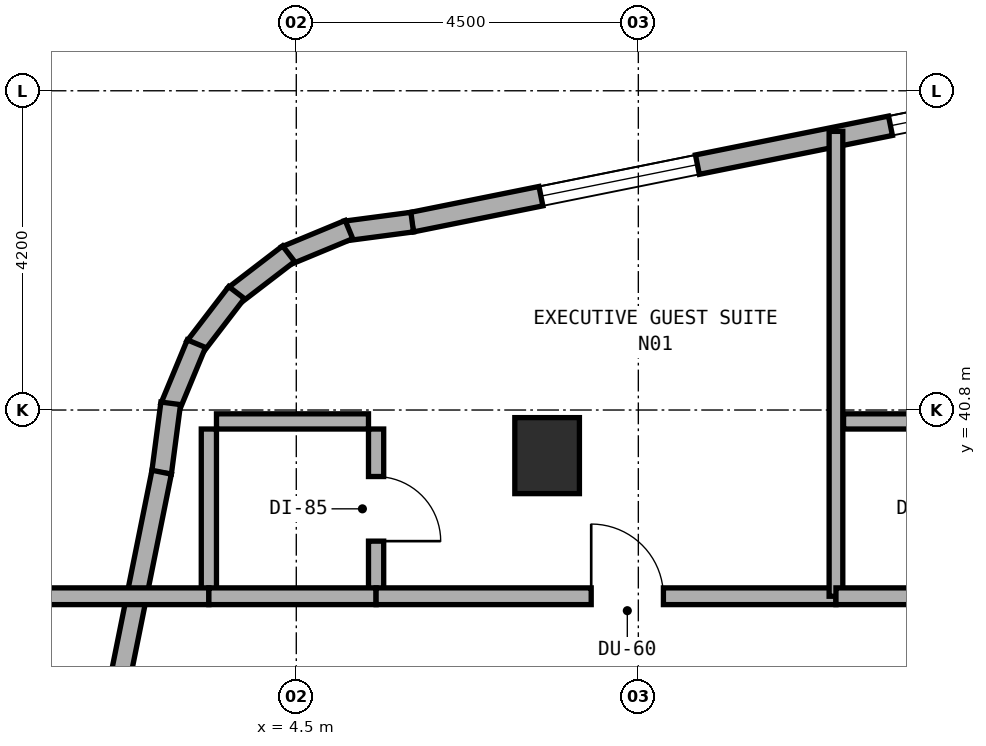
"""IFC4 building model, lengths in metres.
Left out: names, types, materials, properties, quantities, classifications, styles, units other than length and angle.
Written with IfcOpenShell. Run it as: python <this file> out.ifc"""

import sys

from ifc_helpers import new_model, si_unit, direction, frame, frame_2d, origin, origin_2d, place, context, subcontext, project, spatial, rectangle, extrude, element, fill, save


model = new_model("IFC4")
c1 = context("Model", 3, precision=1e-05, world=origin(), true_north=direction((0.0, 1.0)))
c2 = subcontext(c1, "Body", "Model", "MODEL_VIEW")
j1 = project(units=[si_unit("LENGTHUNIT", "METRE"), si_unit("PLANEANGLEUNIT", "RADIAN")], contexts=[c1])
p1 = place(None, origin())
s1 = spatial("IfcSite", under=j1, at=p1, CompositionType="ELEMENT")
p2 = place(p1, origin())
s2 = spatial("IfcBuilding", under=s1, at=p2, CompositionType="ELEMENT")
p3 = place(p2, frame((0.0, 0.0, 138.0)))
s3 = spatial("IfcBuildingStorey", under=s2, at=p3, CompositionType="ELEMENT", Elevation=138.0)
p4 = place(p3, frame((7.8, 40.2, 0.0), z_axis=(0.0, 0.0, 1.0), x_axis=(1.0, 0.0, 0.0)))
e1 = element("IfcColumn", 1, at=p4, inside=s3, PredefinedType="COLUMN", context=c2, shape_type="SweptSolid", body=[
    extrude(rectangle(XDim=0.85, YDim=1.0, at=origin_2d()), origin(), (0.0, 0.0, 1.0), 3.5),
])
p5 = place(p3, frame((15.02, 45.084, 0.0), z_axis=(0.0, 0.0, 1.0), x_axis=(-0.980315963543, -0.197435082048, 0.0)))
e2 = element("IfcWall", 2, at=p5, inside=s3, PredefinedType="STANDARD", context=c2, shape_type="SweptSolid", body=[
    extrude(rectangle(XDim=9.183, YDim=0.26, at=frame_2d((4.591, 0.0))), origin(), (0.0, 0.0, 1.0), 3.22),
])
p6 = place(p5, frame((0.657, 0.0, 0.85)))
e3 = element("IfcOpeningElement", 3, at=p6, cuts=e2, PredefinedType="OPENING", context=c2, shape_type="SweptSolid", body=[
    extrude(rectangle(XDim=2.1, YDim=1.5, at=frame_2d((1.05, 0.75))), frame((0.0, 0.14, 0.0), z_axis=(0.0, -1.0, 0.0), x_axis=(1.0, 0.0, 0.0)), (0.0, 0.0, 1.0), 0.28),
])
p7 = place(p5, frame((5.348, 0.0, 0.85)))
e4 = element("IfcOpeningElement", 4, at=p7, cuts=e2, PredefinedType="OPENING", context=c2, shape_type="SweptSolid", body=[
    extrude(rectangle(XDim=2.1, YDim=1.5, at=frame_2d((1.05, 0.75))), frame((0.0, 0.14, 0.0), z_axis=(0.0, -1.0, 0.0), x_axis=(1.0, 0.0, 0.0)), (0.0, 0.0, 1.0), 0.28),
])
p8 = place(p3, frame((6.025, 43.272, 0.0), z_axis=(0.0, 0.0, 1.0), x_axis=(-0.991388484223, -0.130953706898, 0.0)))
e5 = element("IfcWall", 5, at=p8, inside=s3, PredefinedType="STANDARD", context=c2, shape_type="SweptSolid", body=[
    extrude(rectangle(XDim=0.885, YDim=0.26, at=frame_2d((0.443, 0.0))), origin(), (0.0, 0.0, 1.0), 3.22),
])
p9 = place(p3, frame((5.193, 43.174, 0.0), z_axis=(0.0, 0.0, 1.0), x_axis=(-0.923627776508, -0.383290660547, 0.0)))
e6 = element("IfcWall", 6, at=p9, inside=s3, PredefinedType="STANDARD", context=c2, shape_type="SweptSolid", body=[
    extrude(rectangle(XDim=0.903, YDim=0.26, at=frame_2d((0.452, 0.0))), origin(), (0.0, 0.0, 1.0), 3.22),
])
p10 = place(p3, frame((4.399, 42.856, 0.0), z_axis=(0.0, 0.0, 1.0), x_axis=(-0.793458244748, -0.608624690463, 0.0)))
e7 = element("IfcWall", 7, at=p10, inside=s3, PredefinedType="STANDARD", context=c2, shape_type="SweptSolid", body=[
    extrude(rectangle(XDim=0.902, YDim=0.26, at=frame_2d((0.451, 0.0))), origin(), (0.0, 0.0, 1.0), 3.22),
])
p11 = place(p3, frame((3.714, 42.345, 0.0), z_axis=(0.0, 0.0, 1.0), x_axis=(-0.608494022858, -0.793558456666, 0.0)))
e8 = element("IfcWall", 8, at=p11, inside=s3, PredefinedType="STANDARD", context=c2, shape_type="SweptSolid", body=[
    extrude(rectangle(XDim=0.902, YDim=0.26, at=frame_2d((0.451, 0.0))), origin(), (0.0, 0.0, 1.0), 3.22),
])
p12 = place(p3, frame((3.186, 41.673, 0.0), z_axis=(0.0, 0.0, 1.0), x_axis=(-0.383155708213, -0.923683767999, 0.0)))
e9 = element("IfcWall", 9, at=p12, inside=s3, PredefinedType="STANDARD", context=c2, shape_type="SweptSolid", body=[
    extrude(rectangle(XDim=0.903, YDim=0.26, at=frame_2d((0.451, 0.0))), origin(), (0.0, 0.0, 1.0), 3.22),
])
p13 = place(p3, frame((2.848, 40.888, 0.0), z_axis=(0.0, 0.0, 1.0), x_axis=(-0.130200706103, -0.991487658083, 0.0)))
e10 = element("IfcWall", 10, at=p13, inside=s3, PredefinedType="STANDARD", context=c2, shape_type="SweptSolid", body=[
    extrude(rectangle(XDim=0.921, YDim=0.26, at=frame_2d((0.46, 0.0))), origin(), (0.0, 0.0, 1.0), 3.22),
])
p14 = place(p3, frame((2.729, 39.982, 0.0), z_axis=(0.0, 0.0, 1.0), x_axis=(-0.197435082048, -0.980315963543, 0.0)))
e11 = element("IfcWall", 11, at=p14, inside=s3, PredefinedType="STANDARD", context=c2, shape_type="SweptSolid", body=[
    extrude(rectangle(XDim=9.183, YDim=0.26, at=frame_2d((4.591, 0.0))), origin(), (0.0, 0.0, 1.0), 3.22),
])
p15 = place(p14, frame((4.436, 0.0, 0.85)))
e12 = element("IfcOpeningElement", 12, at=p15, cuts=e11, PredefinedType="OPENING", context=c2, shape_type="SweptSolid", body=[
    extrude(rectangle(XDim=2.1, YDim=1.5, at=frame_2d((1.05, 0.75))), frame((0.0, 0.14, 0.0), z_axis=(0.0, -1.0, 0.0), x_axis=(1.0, 0.0, 0.0)), (0.0, 0.0, 1.0), 0.28),
])
p16 = place(p3, frame((5.55, 38.45, 0.0), z_axis=(0.0, 0.0, 1.0), x_axis=(0.0, 1.0, 0.0)))
e13 = element("IfcWall", 13, at=p16, inside=s3, PredefinedType="PLUMBINGWALL", context=c2, shape_type="SweptSolid", body=[
    extrude(rectangle(XDim=2.1, YDim=0.2, at=frame_2d((1.05, 0.0))), origin(), (0.0, 0.0, 1.0), 3.22),
])
p17 = place(p16, frame((0.625, 0.0, 0.0)))
e14 = element("IfcOpeningElement", 14, at=p17, cuts=e13, PredefinedType="OPENING", context=c2, shape_type="SweptSolid", body=[
    extrude(rectangle(XDim=0.85, YDim=2.1, at=frame_2d((0.425, 1.05))), frame((0.0, 0.11, 0.0), z_axis=(0.0, -1.0, 0.0), x_axis=(1.0, 0.0, 0.0)), (0.0, 0.0, 1.0), 0.22),
])
p18 = place(p3, frame((3.45, 40.65, 0.0), z_axis=(0.0, 0.0, 1.0), x_axis=(1.0, 0.0, 0.0)))
e15 = element("IfcWall", 15, at=p18, inside=s3, PredefinedType="PLUMBINGWALL", context=c2, shape_type="SweptSolid", body=[
    extrude(rectangle(XDim=2.0, YDim=0.2, at=frame_2d((1.0, 0.0))), origin(), (0.0, 0.0, 1.0), 3.22),
])
p19 = place(p3, frame((3.35, 38.45, 0.0), z_axis=(0.0, 0.0, 1.0), x_axis=(0.0, 1.0, 0.0)))
e16 = element("IfcWall", 16, at=p19, inside=s3, PredefinedType="PLUMBINGWALL", context=c2, shape_type="SweptSolid", body=[
    extrude(rectangle(XDim=2.1, YDim=0.2, at=frame_2d((1.05, 0.0))), origin(), (0.0, 0.0, 1.0), 3.22),
])
p20 = place(p3, frame((0.96, 38.35, 0.0), z_axis=(0.0, 0.0, 1.0), x_axis=(1.0, 0.0, 0.0)))
e17 = element("IfcWall", 17, at=p20, inside=s3, PredefinedType="SOLIDWALL", context=c2, shape_type="SweptSolid", body=[
    extrude(rectangle(XDim=2.39, YDim=0.22, at=frame_2d((1.195, 0.0))), origin(), (0.0, 0.0, 1.0), 3.22),
])
p21 = place(p3, frame((3.35, 38.35, 0.0), z_axis=(0.0, 0.0, 1.0), x_axis=(1.0, 0.0, 0.0)))
e18 = element("IfcWall", 18, at=p21, inside=s3, PredefinedType="SOLIDWALL", context=c2, shape_type="SweptSolid", body=[
    extrude(rectangle(XDim=2.2, YDim=0.22, at=frame_2d((1.1, 0.0))), origin(), (0.0, 0.0, 1.0), 3.22),
])
p22 = place(p3, frame((5.55, 38.35, 0.0), z_axis=(0.0, 0.0, 1.0), x_axis=(1.0, 0.0, 0.0)))
e19 = element("IfcWall", 19, at=p22, inside=s3, PredefinedType="SOLIDWALL", context=c2, shape_type="SweptSolid", body=[
    extrude(rectangle(XDim=6.05, YDim=0.22, at=frame_2d((3.025, 0.0))), origin(), (0.0, 0.0, 1.0), 2.695),
])
p23 = place(p22, frame((2.83, 0.0, 0.0)))
e20 = element("IfcOpeningElement", 20, at=p23, cuts=e19, PredefinedType="OPENING", context=c2, shape_type="SweptSolid", body=[
    extrude(rectangle(XDim=0.95, YDim=2.1, at=frame_2d((0.475, 1.05))), frame((0.0, 0.12, 0.0), z_axis=(0.0, -1.0, 0.0), x_axis=(1.0, 0.0, 0.0)), (0.0, 0.0, 1.0), 0.24),
])
p24 = place(p3, frame((11.6, 38.35, 0.0), z_axis=(0.0, 0.0, 1.0), x_axis=(0.0, 1.0, 0.0)))
e21 = element("IfcWall", 21, at=p24, inside=s3, PredefinedType="SOLIDWALL", context=c2, shape_type="SweptSolid", body=[
    extrude(rectangle(XDim=6.116, YDim=0.18, at=frame_2d((3.058, 0.0))), origin(), (0.0, 0.0, 1.0), 2.835),
])
p25 = place(p3, frame((11.7, 40.65, 0.0), z_axis=(0.0, 0.0, 1.0), x_axis=(1.0, 0.0, 0.0)))
e22 = element("IfcWall", 22, at=p25, inside=s3, PredefinedType="PLUMBINGWALL", context=c2, shape_type="SweptSolid", body=[
    extrude(rectangle(XDim=2.0, YDim=0.2, at=frame_2d((1.0, 0.0))), origin(), (0.0, 0.0, 1.0), 2.835),
])
p26 = place(p3, frame((11.6, 38.35, 0.0), z_axis=(0.0, 0.0, 1.0), x_axis=(1.0, 0.0, 0.0)))
e23 = element("IfcWall", 23, at=p26, inside=s3, PredefinedType="SOLIDWALL", context=c2, shape_type="SweptSolid", body=[
    extrude(rectangle(XDim=2.2, YDim=0.22, at=frame_2d((1.1, 0.0))), origin(), (0.0, 0.0, 1.0), 3.22),
])
p27 = place(p6, origin())
e24 = element("IfcWindow", 24, at=p27, inside=s3, PartitioningType="SINGLE_PANEL", PredefinedType="WINDOW", context=c2, shape_type="SweptSolid", body=[
    extrude(rectangle(XDim=2.1, YDim=1.5, at=frame_2d((1.05, 0.75))), frame((0.0, 0.03, 0.0), z_axis=(0.0, -1.0, 0.0), x_axis=(1.0, 0.0, 0.0)), (0.0, 0.0, 1.0), 0.06),
])
fill(e3, e24)
p28 = place(p7, origin())
e25 = element("IfcWindow", 25, at=p28, inside=s3, PartitioningType="SINGLE_PANEL", PredefinedType="WINDOW", context=c2, shape_type="SweptSolid", body=[
    extrude(rectangle(XDim=2.1, YDim=1.5, at=frame_2d((1.05, 0.75))), frame((0.0, 0.03, 0.0), z_axis=(0.0, -1.0, 0.0), x_axis=(1.0, 0.0, 0.0)), (0.0, 0.0, 1.0), 0.06),
])
fill(e4, e25)
p29 = place(p17, frame((0.85, 0.0, 0.0), z_axis=(0.0, 0.0, 1.0), x_axis=(-1.0, 0.0, 0.0)))
e26 = element("IfcDoor", 26, at=p29, inside=s3, OperationType="SINGLE_SWING_RIGHT", PredefinedType="DOOR", context=c2, shape_type="SweptSolid", body=[
    extrude(rectangle(XDim=0.85, YDim=2.1, at=frame_2d((0.425, 1.05))), frame((0.0, 0.025, 0.0), z_axis=(0.0, -1.0, 0.0), x_axis=(1.0, 0.0, 0.0)), (0.0, 0.0, 1.0), 0.05),
])
fill(e14, e26)
p30 = place(p23, origin())
e27 = element("IfcDoor", 27, at=p30, inside=s3, OperationType="SINGLE_SWING_LEFT", PredefinedType="DOOR", context=c2, shape_type="SweptSolid", body=[
    extrude(rectangle(XDim=0.95, YDim=2.1, at=frame_2d((0.475, 1.05))), frame((0.0, 0.025, 0.0), z_axis=(0.0, -1.0, 0.0), x_axis=(1.0, 0.0, 0.0)), (0.0, 0.0, 1.0), 0.05),
])
fill(e20, e27)
save(model, sys.argv[1])
